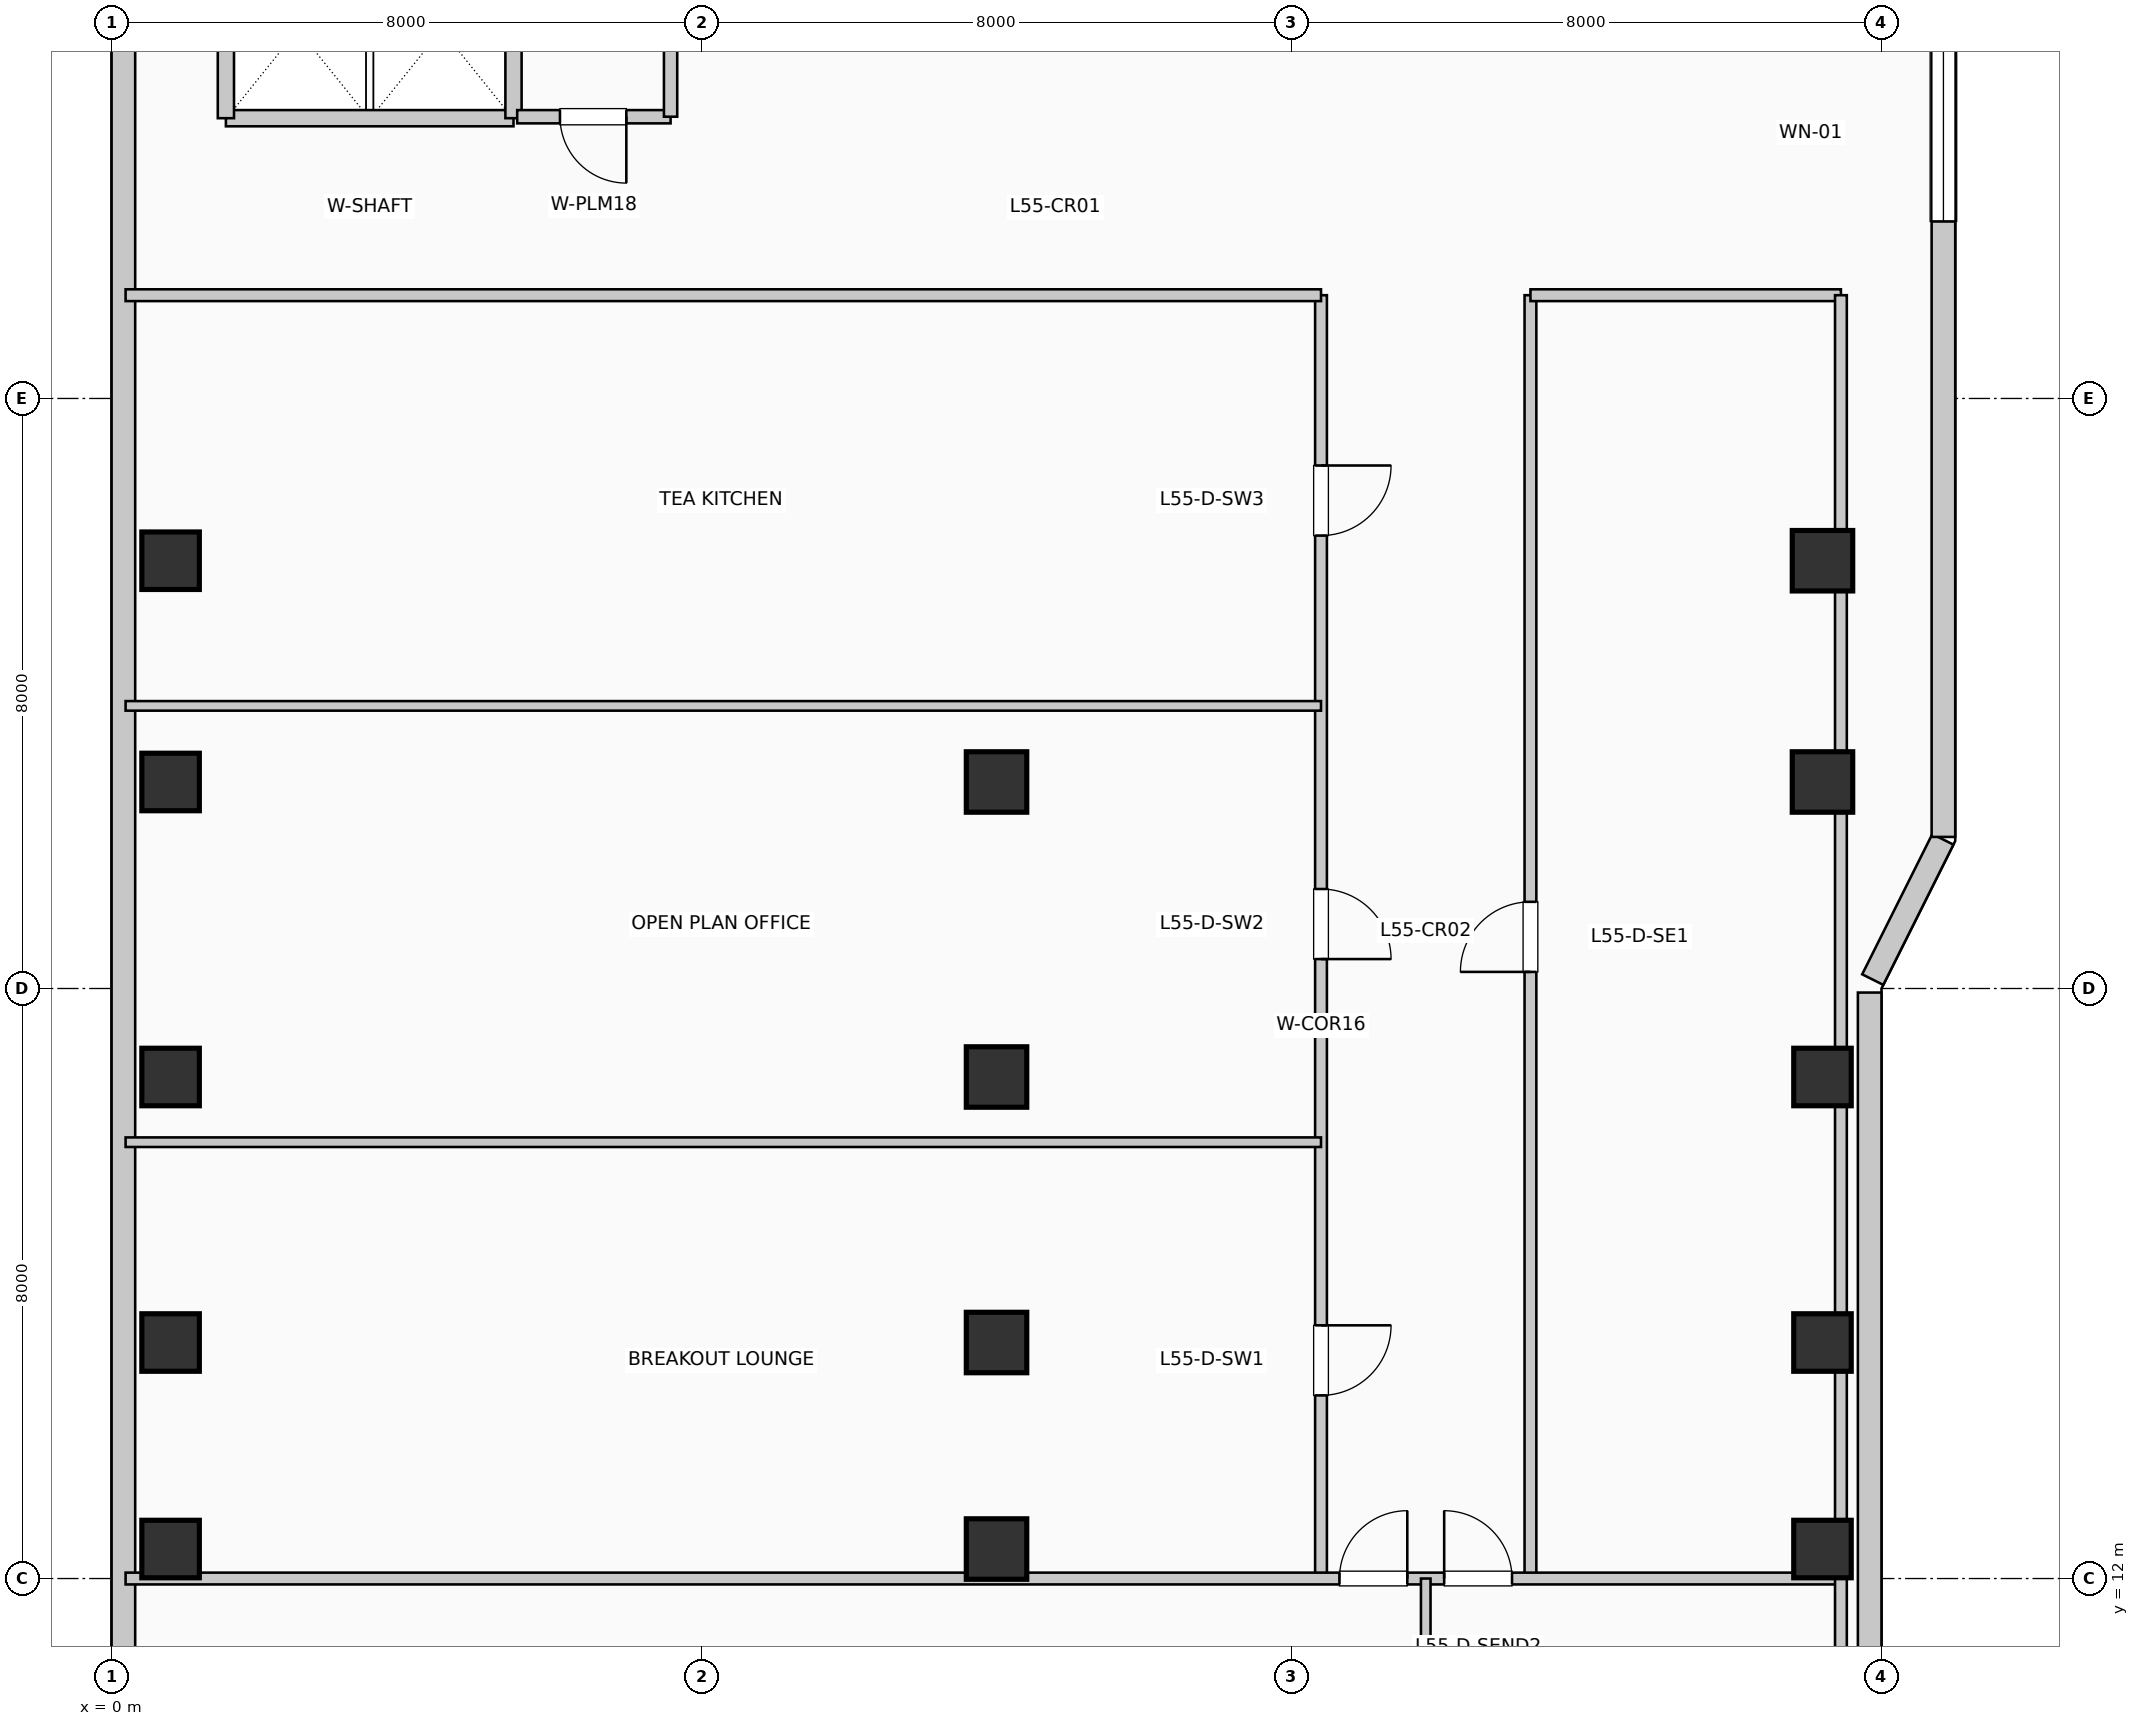
"""IFC4 building model, lengths in metres.
Left out: names, types, materials, properties, quantities, classifications, styles, units other than length and angle.
Written with IfcOpenShell. Run it as: python <this file> out.ifc"""

import sys

from ifc_helpers import new_model, si_unit, direction, frame, frame_2d, origin, origin_2d, place, context, subcontext, project, spatial, rectangle, extrude, element, fill, save


model = new_model("IFC4")
c1 = context("Model", 3, precision=1e-05, world=origin(), true_north=direction((0.0, 1.0)))
c2 = subcontext(c1, "Body", "Model", "MODEL_VIEW")
j1 = project(units=[si_unit("LENGTHUNIT", "METRE"), si_unit("PLANEANGLEUNIT", "RADIAN")], contexts=[c1])
p1 = place(None, origin())
s1 = spatial("IfcSite", under=j1, at=p1, CompositionType="ELEMENT")
p2 = place(p1, origin())
s2 = spatial("IfcBuilding", under=s1, at=p2, CompositionType="ELEMENT")
p3 = place(p2, frame((0.0, 0.0, 227.7)))
s3 = spatial("IfcBuildingStorey", under=s2, at=p3, CompositionType="ELEMENT", Elevation=227.7)
for number, where, z_axis, x_axis in (
    (1, (0.8, 12.4, 0.0), (0.0, 0.0, 1.0), (1.0, 0.0, 0.0)),
    (2, (0.8, 15.2, 0.0), (0.0, 0.0, 1.0), (1.0, 0.0, 0.0)),
    (3, (0.8, 18.8, 0.0), (0.0, 0.0, 1.0), (1.0, 0.0, 0.0)),
    (4, (0.8, 22.8, 0.0), (0.0, 0.0, 1.0), (1.0, 0.0, 0.0)),
    (5, (0.8, 25.8, 0.0), (0.0, 0.0, 1.0), (1.0, 0.0, 0.0)),
):
    element("IfcColumn", number, at=place(p3, frame(where, z_axis=z_axis, x_axis=x_axis)), inside=s3, PredefinedType="COLUMN", context=c2, shape_type="SweptSolid", body=[
        extrude(rectangle(XDim=0.78, YDim=0.78, at=origin_2d()), origin(), (0.0, 0.0, 1.0), 3.96),
    ])
for number, where, z_axis, x_axis in (
    (6, (12.0, 12.4, 0.0), (0.0, 0.0, 1.0), (1.0, 0.0, 0.0)),
    (7, (12.0, 15.2, 0.0), (0.0, 0.0, 1.0), (1.0, 0.0, 0.0)),
    (8, (12.0, 18.8, 0.0), (0.0, 0.0, 1.0), (1.0, 0.0, 0.0)),
    (9, (12.0, 22.8, 0.0), (0.0, 0.0, 1.0), (1.0, 0.0, 0.0)),
):
    element("IfcColumn", number, at=place(p3, frame(where, z_axis=z_axis, x_axis=x_axis)), inside=s3, PredefinedType="COLUMN", context=c2, shape_type="SweptSolid", body=[
        extrude(rectangle(XDim=0.82, YDim=0.82, at=origin_2d()), origin(), (0.0, 0.0, 1.0), 3.96),
    ])
for number, where, z_axis, x_axis in (
    (10, (23.2, 12.4, 0.0), (0.0, 0.0, 1.0), (1.0, 0.0, 0.0)),
    (11, (23.2, 15.2, 0.0), (0.0, 0.0, 1.0), (1.0, 0.0, 0.0)),
    (12, (23.2, 18.8, 0.0), (0.0, 0.0, 1.0), (1.0, 0.0, 0.0)),
):
    element("IfcColumn", number, at=place(p3, frame(where, z_axis=z_axis, x_axis=x_axis)), inside=s3, PredefinedType="COLUMN", context=c2, shape_type="SweptSolid", body=[
        extrude(rectangle(XDim=0.78, YDim=0.78, at=origin_2d()), origin(), (0.0, 0.0, 1.0), 3.96),
    ])
for number, where, z_axis, x_axis in (
    (13, (23.2, 22.8, 0.0), (0.0, 0.0, 1.0), (1.0, 0.0, 0.0)),
    (14, (23.2, 25.8, 0.0), (0.0, 0.0, 1.0), (1.0, 0.0, 0.0)),
):
    element("IfcColumn", number, at=place(p3, frame(where, z_axis=z_axis, x_axis=x_axis)), inside=s3, PredefinedType="COLUMN", context=c2, shape_type="SweptSolid", body=[
        extrude(rectangle(XDim=0.82, YDim=0.82, at=origin_2d()), origin(), (0.0, 0.0, 1.0), 3.96),
    ])
p4 = place(p3, frame((23.84, 8.855, 0.0), z_axis=(0.0, 0.0, 1.0), x_axis=(0.0, 1.0, 0.0)))
e15 = element("IfcWall", 15, at=p4, inside=s3, PredefinedType="SOLIDWALL", context=c2, shape_type="SweptSolid", body=[
    extrude(rectangle(XDim=11.09, YDim=0.32, at=frame_2d((5.545, 0.0))), origin(), (0.0, 0.0, 1.0), 3.71),
])
p5 = place(p3, frame((23.882, 20.121, 0.0), z_axis=(0.0, 0.0, 1.0), x_axis=(0.447121734542, 0.894473115583, 0.0)))
e16 = element("IfcWall", 16, at=p5, inside=s3, PredefinedType="SOLIDWALL", context=c2, shape_type="SweptSolid", body=[
    extrude(rectangle(XDim=2.126, YDim=0.32, at=frame_2d((1.063, 0.0))), origin(), (0.0, 0.0, 1.0), 3.71),
])
p6 = place(p3, frame((24.84, 22.055, 0.0), z_axis=(0.0, 0.0, 1.0), x_axis=(0.0, 1.0, 0.0)))
e17 = element("IfcWall", 17, at=p6, inside=s3, PredefinedType="SOLIDWALL", context=c2, shape_type="SweptSolid", body=[
    extrude(rectangle(XDim=19.09, YDim=0.32, at=frame_2d((9.545, 0.0))), origin(), (0.0, 0.0, 1.0), 3.71),
])
p7 = place(p6, frame((8.345, 0.0, 0.85)))
e18 = element("IfcOpeningElement", 18, at=p7, cuts=e17, PredefinedType="OPENING", context=c2, shape_type="SweptSolid", body=[
    extrude(rectangle(XDim=2.4, YDim=2.05, at=frame_2d((1.2, 1.025))), frame((0.0, 0.17, 0.0), z_axis=(0.0, -1.0, 0.0), x_axis=(1.0, 0.0, 0.0)), (0.0, 0.0, 1.0), 0.34),
])
p8 = place(p3, frame((0.16, 34.395, 0.0), z_axis=(0.0, 0.0, 1.0), x_axis=(0.0, -1.0, 0.0)))
e19 = element("IfcWall", 19, at=p8, inside=s3, PredefinedType="SOLIDWALL", context=c2, shape_type="SweptSolid", body=[
    extrude(rectangle(XDim=25.54, YDim=0.32, at=frame_2d((12.77, 0.0))), origin(), (0.0, 0.0, 1.0), 3.71),
])
p9 = place(p3, frame((1.55, 31.8, 0.0), z_axis=(0.0, 0.0, 1.0), x_axis=(1.0, 0.0, 0.0)))
e20 = element("IfcWall", 20, at=p9, inside=s3, PredefinedType="PARTITIONING", context=c2, shape_type="SweptSolid", body=[
    extrude(rectangle(XDim=3.9, YDim=0.22, at=frame_2d((1.95, 0.0))), origin(), (0.0, 0.0, 1.0), 3.71),
])
for number, where, z_axis, x_axis in (
    (21, (1.55, 31.8, 0.0), (0.0, 0.0, 1.0), (0.0, 1.0, 0.0)),
    (22, (5.45, 31.8, 0.0), (0.0, 0.0, 1.0), (0.0, 1.0, 0.0)),
):
    element("IfcWall", number, at=place(p3, frame(where, z_axis=z_axis, x_axis=x_axis)), inside=s3, PredefinedType="PARTITIONING", context=c2, shape_type="SweptSolid", body=[
        extrude(rectangle(XDim=2.38, YDim=0.22, at=frame_2d((1.19, 0.0))), origin(), (0.0, 0.0, 1.0), 3.71),
    ])
p10 = place(p3, frame((5.5, 31.82, 0.0), z_axis=(0.0, 0.0, 1.0), x_axis=(1.0, 0.0, 0.0)))
e23 = element("IfcWall", 23, at=p10, inside=s3, PredefinedType="PLUMBINGWALL", context=c2, shape_type="SweptSolid", body=[
    extrude(rectangle(XDim=2.08, YDim=0.18, at=frame_2d((1.04, 0.0))), origin(), (0.0, 0.0, 1.0), 3.71),
])
p11 = place(p10, frame((1.48, 0.0, 0.0), z_axis=(0.0, 0.0, 1.0), x_axis=(-1.0, 0.0, 0.0)))
e24 = element("IfcOpeningElement", 24, at=p11, cuts=e23, PredefinedType="OPENING", context=c2, shape_type="SweptSolid", body=[
    extrude(rectangle(XDim=0.9, YDim=2.1, at=frame_2d((0.45, 1.05))), frame((0.0, 0.1, 0.0), z_axis=(0.0, -1.0, 0.0), x_axis=(1.0, 0.0, 0.0)), (0.0, 0.0, 1.0), 0.2),
])
p12 = place(p3, frame((7.58, 31.82, 0.0), z_axis=(0.0, 0.0, 1.0), x_axis=(0.0, 1.0, 0.0)))
e25 = element("IfcWall", 25, at=p12, inside=s3, PredefinedType="PLUMBINGWALL", context=c2, shape_type="SweptSolid", body=[
    extrude(rectangle(XDim=2.36, YDim=0.18, at=frame_2d((1.18, 0.0))), origin(), (0.0, 0.0, 1.0), 3.71),
])
p13 = place(p3, frame((16.4, 12.0, 0.0), z_axis=(0.0, 0.0, 1.0), x_axis=(0.0, 1.0, 0.0)))
e26 = element("IfcWall", 26, at=p13, inside=s3, PredefinedType="PARTITIONING", context=c2, shape_type="SweptSolid", body=[
    extrude(rectangle(XDim=17.4, YDim=0.16, at=frame_2d((8.7, 0.0))), origin(), (0.0, 0.0, 1.0), 3.71),
])
p14 = place(p13, frame((3.433, 0.0, 0.0), z_axis=(0.0, 0.0, 1.0), x_axis=(-1.0, 0.0, 0.0)))
e27 = element("IfcOpeningElement", 27, at=p14, cuts=e26, PredefinedType="OPENING", context=c2, shape_type="SweptSolid", body=[
    extrude(rectangle(XDim=0.95, YDim=2.15, at=frame_2d((0.475, 1.075))), frame((0.0, 0.09, 0.0), z_axis=(0.0, -1.0, 0.0), x_axis=(1.0, 0.0, 0.0)), (0.0, 0.0, 1.0), 0.18),
])
p15 = place(p13, frame((9.349, 0.0, 0.0), z_axis=(0.0, 0.0, 1.0), x_axis=(-1.0, 0.0, 0.0)))
e28 = element("IfcOpeningElement", 28, at=p15, cuts=e26, PredefinedType="OPENING", context=c2, shape_type="SweptSolid", body=[
    extrude(rectangle(XDim=0.95, YDim=2.15, at=frame_2d((0.475, 1.075))), frame((0.0, 0.09, 0.0), z_axis=(0.0, -1.0, 0.0), x_axis=(1.0, 0.0, 0.0)), (0.0, 0.0, 1.0), 0.18),
])
p16 = place(p13, frame((15.091, 0.0, 0.0), z_axis=(0.0, 0.0, 1.0), x_axis=(-1.0, 0.0, 0.0)))
e29 = element("IfcOpeningElement", 29, at=p16, cuts=e26, PredefinedType="OPENING", context=c2, shape_type="SweptSolid", body=[
    extrude(rectangle(XDim=0.95, YDim=2.15, at=frame_2d((0.475, 1.075))), frame((0.0, 0.09, 0.0), z_axis=(0.0, -1.0, 0.0), x_axis=(1.0, 0.0, 0.0)), (0.0, 0.0, 1.0), 0.18),
])
p17 = place(p3, frame((19.24, 12.0, 0.0), z_axis=(0.0, 0.0, 1.0), x_axis=(0.0, 1.0, 0.0)))
e30 = element("IfcWall", 30, at=p17, inside=s3, PredefinedType="PARTITIONING", context=c2, shape_type="SweptSolid", body=[
    extrude(rectangle(XDim=17.4, YDim=0.16, at=frame_2d((8.7, 0.0))), origin(), (0.0, 0.0, 1.0), 3.71),
])
p18 = place(p17, frame((8.225, 0.0, 0.0)))
e31 = element("IfcOpeningElement", 31, at=p18, cuts=e30, PredefinedType="OPENING", context=c2, shape_type="SweptSolid", body=[
    extrude(rectangle(XDim=0.95, YDim=2.15, at=frame_2d((0.475, 1.075))), frame((0.0, 0.09, 0.0), z_axis=(0.0, -1.0, 0.0), x_axis=(1.0, 0.0, 0.0)), (0.0, 0.0, 1.0), 0.18),
])
p19 = place(p3, frame((0.19, 12.0, 0.0), z_axis=(0.0, 0.0, 1.0), x_axis=(1.0, 0.0, 0.0)))
e32 = element("IfcWall", 32, at=p19, inside=s3, PredefinedType="PARTITIONING", context=c2, shape_type="SweptSolid", body=[
    extrude(rectangle(XDim=23.26, YDim=0.16, at=frame_2d((11.63, 0.0))), origin(), (0.0, 0.0, 1.0), 3.095),
])
p20 = place(p19, frame((16.46, 0.0, 0.0)))
e33 = element("IfcOpeningElement", 33, at=p20, cuts=e32, PredefinedType="OPENING", context=c2, shape_type="SweptSolid", body=[
    extrude(rectangle(XDim=0.92, YDim=2.1, at=frame_2d((0.46, 1.05))), frame((0.0, 0.09, 0.0), z_axis=(0.0, -1.0, 0.0), x_axis=(1.0, 0.0, 0.0)), (0.0, 0.0, 1.0), 0.18),
])
p21 = place(p19, frame((17.88, 0.0, 0.0)))
e34 = element("IfcOpeningElement", 34, at=p21, cuts=e32, PredefinedType="OPENING", context=c2, shape_type="SweptSolid", body=[
    extrude(rectangle(XDim=0.92, YDim=2.1, at=frame_2d((0.46, 1.05))), frame((0.0, 0.09, 0.0), z_axis=(0.0, -1.0, 0.0), x_axis=(1.0, 0.0, 0.0)), (0.0, 0.0, 1.0), 0.18),
])
p22 = place(p3, frame((0.19, 29.4, 0.0), z_axis=(0.0, 0.0, 1.0), x_axis=(1.0, 0.0, 0.0)))
e35 = element("IfcWall", 35, at=p22, inside=s3, PredefinedType="PARTITIONING", context=c2, shape_type="SweptSolid", body=[
    extrude(rectangle(XDim=16.21, YDim=0.16, at=frame_2d((8.105, 0.0))), origin(), (0.0, 0.0, 1.0), 3.365),
])
p23 = place(p3, frame((19.24, 29.4, 0.0), z_axis=(0.0, 0.0, 1.0), x_axis=(1.0, 0.0, 0.0)))
e36 = element("IfcWall", 36, at=p23, inside=s3, PredefinedType="PARTITIONING", context=c2, shape_type="SweptSolid", body=[
    extrude(rectangle(XDim=4.21, YDim=0.16, at=frame_2d((2.105, 0.0))), origin(), (0.0, 0.0, 1.0), 3.365),
])
p24 = place(p3, frame((23.45, 6.84, 0.0), z_axis=(0.0, 0.0, 1.0), x_axis=(0.0, 1.0, 0.0)))
e37 = element("IfcWall", 37, at=p24, inside=s3, PredefinedType="PARTITIONING", context=c2, shape_type="SweptSolid", body=[
    extrude(rectangle(XDim=22.56, YDim=0.16, at=frame_2d((11.28, 0.0))), origin(), (0.0, 0.0, 1.0), 3.095),
])
p25 = place(p3, frame((17.82, 5.99, 0.0), z_axis=(0.0, 0.0, 1.0), x_axis=(0.0, 1.0, 0.0)))
e38 = element("IfcWall", 38, at=p25, inside=s3, PredefinedType="PARTITIONING", context=c2, shape_type="SweptSolid", body=[
    extrude(rectangle(XDim=6.01, YDim=0.13, at=frame_2d((3.005, 0.0))), origin(), (0.0, 0.0, 1.0), 3.71),
])
for number, where, z_axis, x_axis in (
    (39, (0.19, 17.916, 0.0), (0.0, 0.0, 1.0), (1.0, 0.0, 0.0)),
    (40, (0.19, 23.832, 0.0), (0.0, 0.0, 1.0), (1.0, 0.0, 0.0)),
):
    element("IfcWall", number, at=place(p3, frame(where, z_axis=z_axis, x_axis=x_axis)), inside=s3, PredefinedType="PARTITIONING", context=c2, shape_type="SweptSolid", body=[
        extrude(rectangle(XDim=16.21, YDim=0.13, at=frame_2d((8.105, 0.0))), origin(), (0.0, 0.0, 1.0), 3.71),
    ])
p26 = place(p7, origin())
e41 = element("IfcWindow", 41, at=p26, inside=s3, PartitioningType="SINGLE_PANEL", PredefinedType="WINDOW", context=c2, shape_type="SweptSolid", body=[
    extrude(rectangle(XDim=2.4, YDim=2.05, at=frame_2d((1.2, 1.025))), frame((0.0, 0.03, 0.0), z_axis=(0.0, -1.0, 0.0), x_axis=(1.0, 0.0, 0.0)), (0.0, 0.0, 1.0), 0.06),
])
fill(e18, e41)
p27 = place(p11, origin())
e42 = element("IfcDoor", 42, at=p27, inside=s3, OperationType="SINGLE_SWING_RIGHT", PredefinedType="DOOR", context=c2, shape_type="SweptSolid", body=[
    extrude(rectangle(XDim=0.9, YDim=2.1, at=frame_2d((0.45, 1.05))), frame((0.0, 0.025, 0.0), z_axis=(0.0, -1.0, 0.0), x_axis=(1.0, 0.0, 0.0)), (0.0, 0.0, 1.0), 0.05),
])
fill(e24, e42)
p28 = place(p20, origin())
e43 = element("IfcDoor", 43, at=p28, inside=s3, OperationType="SINGLE_SWING_RIGHT", PredefinedType="DOOR", context=c2, shape_type="SweptSolid", body=[
    extrude(rectangle(XDim=0.92, YDim=2.1, at=frame_2d((0.46, 1.05))), frame((0.0, 0.025, 0.0), z_axis=(0.0, -1.0, 0.0), x_axis=(1.0, 0.0, 0.0)), (0.0, 0.0, 1.0), 0.05),
])
fill(e33, e43)
p29 = place(p21, origin())
e44 = element("IfcDoor", 44, at=p29, inside=s3, OperationType="SINGLE_SWING_LEFT", PredefinedType="DOOR", context=c2, shape_type="SweptSolid", body=[
    extrude(rectangle(XDim=0.92, YDim=2.1, at=frame_2d((0.46, 1.05))), frame((0.0, 0.025, 0.0), z_axis=(0.0, -1.0, 0.0), x_axis=(1.0, 0.0, 0.0)), (0.0, 0.0, 1.0), 0.05),
])
fill(e34, e44)
p30 = place(p14, origin())
e45 = element("IfcDoor", 45, at=p30, inside=s3, OperationType="SINGLE_SWING_RIGHT", PredefinedType="DOOR", context=c2, shape_type="SweptSolid", body=[
    extrude(rectangle(XDim=0.95, YDim=2.15, at=frame_2d((0.475, 1.075))), frame((0.0, 0.025, 0.0), z_axis=(0.0, -1.0, 0.0), x_axis=(1.0, 0.0, 0.0)), (0.0, 0.0, 1.0), 0.05),
])
fill(e27, e45)
p31 = place(p15, origin())
e46 = element("IfcDoor", 46, at=p31, inside=s3, OperationType="SINGLE_SWING_LEFT", PredefinedType="DOOR", context=c2, shape_type="SweptSolid", body=[
    extrude(rectangle(XDim=0.95, YDim=2.15, at=frame_2d((0.475, 1.075))), frame((0.0, 0.025, 0.0), z_axis=(0.0, -1.0, 0.0), x_axis=(1.0, 0.0, 0.0)), (0.0, 0.0, 1.0), 0.05),
])
fill(e28, e46)
p32 = place(p16, origin())
e47 = element("IfcDoor", 47, at=p32, inside=s3, OperationType="SINGLE_SWING_RIGHT", PredefinedType="DOOR", context=c2, shape_type="SweptSolid", body=[
    extrude(rectangle(XDim=0.95, YDim=2.15, at=frame_2d((0.475, 1.075))), frame((0.0, 0.025, 0.0), z_axis=(0.0, -1.0, 0.0), x_axis=(1.0, 0.0, 0.0)), (0.0, 0.0, 1.0), 0.05),
])
fill(e29, e47)
p33 = place(p18, origin())
e48 = element("IfcDoor", 48, at=p33, inside=s3, OperationType="SINGLE_SWING_LEFT", PredefinedType="DOOR", context=c2, shape_type="SweptSolid", body=[
    extrude(rectangle(XDim=0.95, YDim=2.15, at=frame_2d((0.475, 1.075))), frame((0.0, 0.025, 0.0), z_axis=(0.0, -1.0, 0.0), x_axis=(1.0, 0.0, 0.0)), (0.0, 0.0, 1.0), 0.05),
])
fill(e31, e48)
save(model, sys.argv[1])
